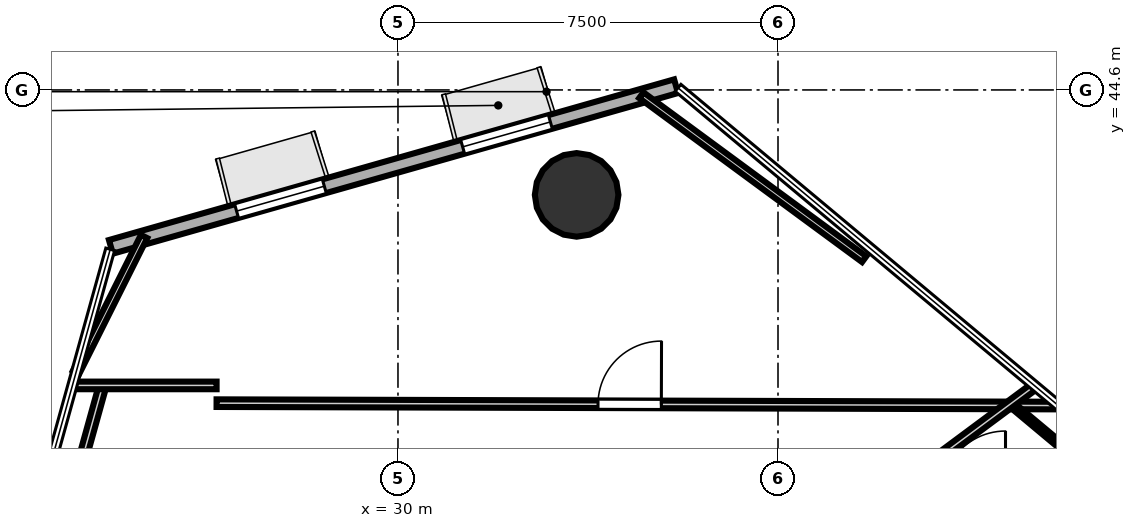
"""IFC4 building model, lengths in metres.
Left out: names, types, materials, properties, quantities, classifications, styles, units other than length and angle.
Written with IfcOpenShell. Run it as: python <this file> out.ifc"""

import sys

from ifc_helpers import new_model, si_unit, direction, frame, frame_2d, origin, origin_2d, place, context, subcontext, project, spatial, rectangle, hollow_circle, extrude, element, fill, save


model = new_model("IFC4")
c1 = context("Model", 3, precision=1e-05, world=origin(), true_north=direction((0.0, 1.0)))
c2 = subcontext(c1, "Body", "Model", "MODEL_VIEW")
j1 = project(units=[si_unit("LENGTHUNIT", "METRE"), si_unit("PLANEANGLEUNIT", "RADIAN")], contexts=[c1])
p1 = place(None, origin())
s1 = spatial("IfcSite", under=j1, at=p1, CompositionType="ELEMENT")
p2 = place(p1, origin())
s2 = spatial("IfcBuilding", under=s1, at=p2, CompositionType="ELEMENT")
p3 = place(p2, frame((0.0, 0.0, 78.4)))
s3 = spatial("IfcBuildingStorey", under=s2, at=p3, CompositionType="ELEMENT", Elevation=78.4)
p4 = place(p3, frame((33.526, 42.529, 0.0), z_axis=(0.0, 0.0, 1.0), x_axis=(1.0, 0.0, 0.0)))
e1 = element("IfcColumn", 1, at=p4, inside=s3, PredefinedType="COLUMN", context=c2, shape_type="SweptSolid", body=[
    extrude(hollow_circle(Radius=0.825, WallThickness=0.04, at=origin_2d()), origin(), (0.0, 0.0, 1.0), 3.7),
])
p5 = place(p3, frame((35.488, 44.674, 0.0), z_axis=(0.0, 0.0, 1.0), x_axis=(-0.961902016128, -0.273394424538, 0.0)))
e2 = element("IfcWall", 2, at=p5, inside=s3, PredefinedType="SOLIDWALL", context=c2, shape_type="SweptSolid", body=[
    extrude(rectangle(XDim=11.595, YDim=0.28, at=frame_2d((5.798, 0.0))), origin(), (0.0, 0.0, 1.0), 3.52),
])
p6 = place(p5, frame((2.579, 0.0, 0.85)))
e3 = element("IfcOpeningElement", 3, at=p6, cuts=e2, PredefinedType="OPENING", context=c2, shape_type="SweptSolid", body=[
    extrude(rectangle(XDim=1.8, YDim=2.1, at=frame_2d((0.9, 1.05))), frame((0.0, 0.15, 0.0), z_axis=(0.0, -1.0, 0.0), x_axis=(1.0, 0.0, 0.0)), (0.0, 0.0, 1.0), 0.3),
])
p7 = place(p5, frame((7.217, 0.0, 0.85)))
e4 = element("IfcOpeningElement", 4, at=p7, cuts=e2, PredefinedType="OPENING", context=c2, shape_type="SweptSolid", body=[
    extrude(rectangle(XDim=1.8, YDim=2.1, at=frame_2d((0.9, 1.05))), frame((0.0, 0.15, 0.0), z_axis=(0.0, -1.0, 0.0), x_axis=(1.0, 0.0, 0.0)), (0.0, 0.0, 1.0), 0.3),
])
p8 = place(p3, frame((23.58, 36.633, 0.0), z_axis=(0.0, 0.0, 1.0), x_axis=(0.267559547286, 0.963541326906, 0.0)))
e5 = element("IfcWall", 5, at=p8, inside=s3, PredefinedType="PARTITIONING", context=c2, shape_type="SweptSolid", body=[
    extrude(rectangle(XDim=2.24, YDim=0.15, at=frame_2d((1.12, 0.0))), origin(), (0.0, 0.0, 1.0), 2.84),
])
p9 = place(p3, frame((23.555, 38.769, 0.0), z_axis=(0.0, 0.0, 1.0), x_axis=(1.0, 0.0, 0.0)))
e6 = element("IfcWall", 6, at=p9, inside=s3, PredefinedType="PARTITIONING", context=c2, shape_type="SweptSolid", body=[
    extrude(rectangle(XDim=2.865, YDim=0.15, at=frame_2d((1.432, 0.0))), origin(), (0.0, 0.0, 1.0), 2.84),
])
p10 = place(p3, frame((26.42, 38.419, 0.0), z_axis=(0.0, 0.0, 1.0), x_axis=(0.999995903761, -0.002862247552, 0.0)))
e7 = element("IfcWall", 7, at=p10, inside=s3, PredefinedType="PARTITIONING", context=c2, shape_type="SweptSolid", body=[
    extrude(rectangle(XDim=16.633, YDim=0.15, at=frame_2d((8.316, 0.0))), origin(), (0.0, 0.0, 1.0), 2.798),
])
p11 = place(p10, frame((7.528, 0.0, 0.0)))
e8 = element("IfcOpeningElement", 8, at=p11, cuts=e7, PredefinedType="OPENING", context=c2, shape_type="SweptSolid", body=[
    extrude(rectangle(XDim=1.25, YDim=2.2, at=frame_2d((0.625, 1.1))), frame((0.0, 0.085, 0.0), z_axis=(0.0, -1.0, 0.0), x_axis=(1.0, 0.0, 0.0)), (0.0, 0.0, 1.0), 0.17),
])
p12 = place(p3, frame((42.584, 38.771, 0.0), z_axis=(0.0, 0.0, 1.0), x_axis=(-0.802818352311, -0.596223693921, 0.0)))
e9 = element("IfcWall", 9, at=p12, inside=s3, PredefinedType="PARTITIONING", context=c2, shape_type="SweptSolid", body=[
    extrude(rectangle(XDim=3.451, YDim=0.15, at=frame_2d((1.725, 0.0))), origin(), (0.0, 0.0, 1.0), 2.798),
])
p13 = place(p3, frame((42.184, 38.33, 0.0), z_axis=(0.0, 0.0, 1.0), x_axis=(0.767463569337, -0.641092559417, 0.0)))
e10 = element("IfcWall", 10, at=p13, inside=s3, PredefinedType="PARTITIONING", context=c2, shape_type="SweptSolid", body=[
    extrude(rectangle(XDim=5.207, YDim=0.12, at=frame_2d((2.603, 0.0))), origin(), (0.0, 0.0, 1.0), 2.798),
])
p14 = place(p3, frame((34.802, 44.496, 0.0), z_axis=(0.0, 0.0, 1.0), x_axis=(0.805455763376, -0.59265589784, 0.0)))
e11 = element("IfcWall", 11, at=p14, inside=s3, PredefinedType="PARTITIONING", context=c2, shape_type="SweptSolid", body=[
    extrude(rectangle(XDim=5.46, YDim=0.14, at=frame_2d((2.73, 0.0))), origin(), (0.0, 0.0, 1.0), 2.84),
])
p15 = place(p3, frame((23.646, 39.026, 0.0), z_axis=(0.0, 0.0, 1.0), x_axis=(0.447702019823, 0.894182812095, 0.0)))
e12 = element("IfcWall", 12, at=p15, inside=s3, PredefinedType="PARTITIONING", context=c2, shape_type="SweptSolid", body=[
    extrude(rectangle(XDim=2.999, YDim=0.14, at=frame_2d((1.5, 0.0))), origin(), (0.0, 0.0, 1.0), 2.84),
])
p16 = place(p11, origin())
e13 = element("IfcDoor", 13, at=p16, inside=s3, OperationType="SINGLE_SWING_RIGHT", PredefinedType="DOOR", context=c2, shape_type="SweptSolid", body=[
    extrude(rectangle(XDim=1.25, YDim=2.2, at=frame_2d((0.625, 1.1))), frame((0.0, 0.025, 0.0), z_axis=(0.0, -1.0, 0.0), x_axis=(1.0, 0.0, 0.0)), (0.0, 0.0, 1.0), 0.05),
])
fill(e8, e13)
p17 = place(p6, origin())
e14 = element("IfcWindow", 14, at=p17, inside=s3, PartitioningType="SINGLE_PANEL", PredefinedType="WINDOW", context=c2, shape_type="SweptSolid", body=[
    extrude(rectangle(XDim=1.8, YDim=2.1, at=frame_2d((0.9, 1.05))), frame((0.0, 0.03, 0.0), z_axis=(0.0, -1.0, 0.0), x_axis=(1.0, 0.0, 0.0)), (0.0, 0.0, 1.0), 0.06),
])
fill(e3, e14)
p18 = place(p7, origin())
e15 = element("IfcWindow", 15, at=p18, inside=s3, PartitioningType="SINGLE_PANEL", PredefinedType="WINDOW", context=c2, shape_type="SweptSolid", body=[
    extrude(rectangle(XDim=1.8, YDim=2.1, at=frame_2d((0.9, 1.05))), frame((0.0, 0.03, 0.0), z_axis=(0.0, -1.0, 0.0), x_axis=(1.0, 0.0, 0.0)), (0.0, 0.0, 1.0), 0.06),
])
fill(e4, e15)
save(model, sys.argv[1])
